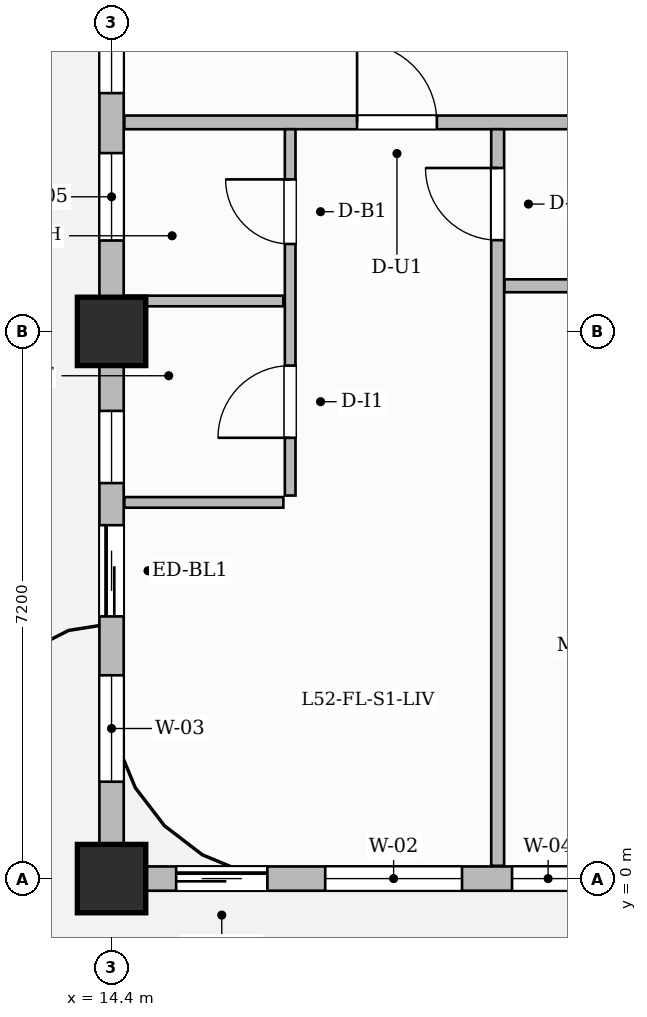
"""IFC4 building model, lengths in metres.
Left out: names, types, materials, properties, quantities, classifications, styles, units other than length and angle.
Written with IfcOpenShell. Run it as: python <this file> out.ifc"""

import sys

from ifc_helpers import new_model, si_unit, direction, frame, frame_2d, origin, origin_2d, place, context, subcontext, project, spatial, rectangle, extrude, source, transform, mapped, element, fill, save


model = new_model("IFC4")
c1 = context("Model", 3, precision=1e-05, world=origin(), true_north=direction((0.0, 1.0)))
c2 = subcontext(c1, "Body", "Model", "MODEL_VIEW")
j1 = project(units=[si_unit("LENGTHUNIT", "METRE"), si_unit("PLANEANGLEUNIT", "RADIAN")], contexts=[c1])
p1 = place(None, origin())
s1 = spatial("IfcSite", under=j1, at=p1, CompositionType="ELEMENT")
p2 = place(p1, origin())
s2 = spatial("IfcBuilding", under=s1, at=p2, CompositionType="ELEMENT")
p3 = place(p2, frame((0.0, 0.0, 209.6)))
s3 = spatial("IfcBuildingStorey", under=s2, at=p3, CompositionType="ELEMENT", Elevation=209.6)
m1 = source(origin(), c2, "Body", "SweptSolid", [
    extrude(rectangle(XDim=0.9, YDim=0.9, at=origin_2d()), origin(), (0.0, 0.0, 1.0), 3.85),
])
for number, where, z_axis, x_axis in (
    (1, (14.4, 0.0, 0.0), (0.0, 0.0, 1.0), (1.0, 0.0, 0.0)),
    (2, (14.4, 7.2, 0.0), (0.0, 0.0, 1.0), (1.0, 0.0, 0.0)),
):
    element("IfcColumn", number, at=place(p3, frame(where, z_axis=z_axis, x_axis=x_axis)), inside=s3, PredefinedType="COLUMN", context=c2, shape_type="MappedRepresentation", body=[
        mapped(m1, transform((0.0, 0.0, 0.0), scale=1.0)),
    ])
p4 = place(p3, frame((14.568, 9.95, 0.0), z_axis=(0.0, 0.0, 1.0), x_axis=(1.0, 0.0, 0.0)))
e3 = element("IfcWall", 3, at=p4, inside=s3, PredefinedType="PARTITIONING", context=c2, shape_type="SweptSolid", body=[
    extrude(rectangle(XDim=15.542, YDim=0.18, at=frame_2d((7.771, 0.0))), origin(), (0.0, 0.0, 1.0), 3.6),
])
p5 = place(p4, frame((3.062, 0.0, 0.0)))
e4 = element("IfcOpeningElement", 4, at=p5, cuts=e3, PredefinedType="OPENING", context=c2, shape_type="SweptSolid", body=[
    extrude(rectangle(XDim=1.05, YDim=2.25, at=frame_2d((0.525, 1.125))), frame((0.0, 0.1, 0.0), z_axis=(0.0, -1.0, 0.0), x_axis=(1.0, 0.0, 0.0)), (0.0, 0.0, 1.0), 0.2),
])
p6 = place(p3, frame((16.75, 5.04, 0.0), z_axis=(0.0, 0.0, 1.0), x_axis=(0.0, 1.0, 0.0)))
e5 = element("IfcWall", 5, at=p6, inside=s3, PredefinedType="PARTITIONING", context=c2, shape_type="SweptSolid", body=[
    extrude(rectangle(XDim=4.82, YDim=0.14, at=frame_2d((2.41, 0.0))), origin(), (0.0, 0.0, 1.0), 3.6),
])
p7 = place(p6, frame((0.76, 0.0, 0.0)))
e6 = element("IfcOpeningElement", 6, at=p7, cuts=e5, PredefinedType="OPENING", context=c2, shape_type="SweptSolid", body=[
    extrude(rectangle(XDim=0.95, YDim=2.15, at=frame_2d((0.475, 1.075))), frame((0.0, 0.08, 0.0), z_axis=(0.0, -1.0, 0.0), x_axis=(1.0, 0.0, 0.0)), (0.0, 0.0, 1.0), 0.16),
])
p8 = place(p6, frame((3.31, 0.0, 0.0)))
e7 = element("IfcOpeningElement", 7, at=p8, cuts=e5, PredefinedType="OPENING", context=c2, shape_type="SweptSolid", body=[
    extrude(rectangle(XDim=0.85, YDim=2.1, at=frame_2d((0.425, 1.05))), frame((0.0, 0.08, 0.0), z_axis=(0.0, -1.0, 0.0), x_axis=(1.0, 0.0, 0.0)), (0.0, 0.0, 1.0), 0.16),
])
p9 = place(p3, frame((14.59, 7.6, 0.0), z_axis=(0.0, 0.0, 1.0), x_axis=(1.0, 0.0, 0.0)))
e8 = element("IfcWall", 8, at=p9, inside=s3, PredefinedType="PARTITIONING", context=c2, shape_type="SweptSolid", body=[
    extrude(rectangle(XDim=2.07, YDim=0.14, at=frame_2d((1.035, 0.0))), origin(), (0.0, 0.0, 1.0), 3.6),
])
p10 = place(p3, frame((14.568, 4.95, 0.0), z_axis=(0.0, 0.0, 1.0), x_axis=(1.0, 0.0, 0.0)))
e9 = element("IfcWall", 9, at=p10, inside=s3, PredefinedType="PARTITIONING", context=c2, shape_type="SweptSolid", body=[
    extrude(rectangle(XDim=2.092, YDim=0.14, at=frame_2d((1.046, 0.0))), origin(), (0.0, 0.0, 1.0), 3.6),
])
p11 = place(p3, frame((19.48, 0.168, 0.0), z_axis=(0.0, 0.0, 1.0), x_axis=(0.0, 1.0, 0.0)))
e10 = element("IfcWall", 10, at=p11, inside=s3, PredefinedType="PARTITIONING", context=c2, shape_type="SweptSolid", body=[
    extrude(rectangle(XDim=9.692, YDim=0.17, at=frame_2d((4.846, 0.0))), origin(), (0.0, 0.0, 1.0), 3.6),
])
p12 = place(p11, frame((8.232, 0.0, 0.0)))
e11 = element("IfcOpeningElement", 11, at=p12, cuts=e10, PredefinedType="OPENING", context=c2, shape_type="SweptSolid", body=[
    extrude(rectangle(XDim=0.95, YDim=2.15, at=frame_2d((0.475, 1.075))), frame((0.0, 0.095, 0.0), z_axis=(0.0, -1.0, 0.0), x_axis=(1.0, 0.0, 0.0)), (0.0, 0.0, 1.0), 0.19),
])
p13 = place(p3, frame((19.57, 7.8, 0.0), z_axis=(0.0, 0.0, 1.0), x_axis=(1.0, 0.0, 0.0)))
e12 = element("IfcWall", 12, at=p13, inside=s3, PredefinedType="PARTITIONING", context=c2, shape_type="SweptSolid", body=[
    extrude(rectangle(XDim=10.54, YDim=0.17, at=frame_2d((5.27, 0.0))), origin(), (0.0, 0.0, 1.0), 3.6),
])
p14 = place(p13, frame((2.646, 0.0, 0.0)))
e13 = element("IfcOpeningElement", 13, at=p14, cuts=e12, PredefinedType="OPENING", context=c2, shape_type="SweptSolid", body=[
    extrude(rectangle(XDim=0.95, YDim=2.15, at=frame_2d((0.475, 1.075))), frame((0.0, 0.095, 0.0), z_axis=(0.0, -1.0, 0.0), x_axis=(1.0, 0.0, 0.0)), (0.0, 0.0, 1.0), 0.19),
])
p15 = place(p13, frame((4.865, 0.0, 0.0)))
e14 = element("IfcOpeningElement", 14, at=p15, cuts=e12, PredefinedType="OPENING", context=c2, shape_type="SweptSolid", body=[
    extrude(rectangle(XDim=0.95, YDim=2.15, at=frame_2d((0.475, 1.075))), frame((0.0, 0.095, 0.0), z_axis=(0.0, -1.0, 0.0), x_axis=(1.0, 0.0, 0.0)), (0.0, 0.0, 1.0), 0.19),
])
p16 = place(p13, frame((7.055, 0.0, 0.0)))
e15 = element("IfcOpeningElement", 15, at=p16, cuts=e12, PredefinedType="OPENING", context=c2, shape_type="SweptSolid", body=[
    extrude(rectangle(XDim=0.95, YDim=2.15, at=frame_2d((0.475, 1.075))), frame((0.0, 0.095, 0.0), z_axis=(0.0, -1.0, 0.0), x_axis=(1.0, 0.0, 0.0)), (0.0, 0.0, 1.0), 0.19),
])
p17 = place(p3, frame((14.4, 0.0, 0.0), z_axis=(0.0, 0.0, 1.0), x_axis=(1.0, 0.0, 0.0)))
e16 = element("IfcWall", 16, at=p17, inside=s3, PredefinedType="SOLIDWALL", context=c2, shape_type="SweptSolid", body=[
    extrude(rectangle(XDim=35.4, YDim=0.32, at=frame_2d((17.7, 0.0))), origin(), (0.0, 0.0, 1.0), 3.085),
])
p18 = place(p17, frame((0.85, 0.0, 0.0)))
e17 = element("IfcOpeningElement", 17, at=p18, cuts=e16, PredefinedType="OPENING", context=c2, shape_type="SweptSolid", body=[
    extrude(rectangle(XDim=1.2, YDim=2.2, at=frame_2d((0.6, 1.1))), frame((0.0, 0.17, 0.0), z_axis=(0.0, -1.0, 0.0), x_axis=(1.0, 0.0, 0.0)), (0.0, 0.0, 1.0), 0.34),
])
p19 = place(p17, frame((2.811, 0.0, 0.8)))
e18 = element("IfcOpeningElement", 18, at=p19, cuts=e16, PredefinedType="OPENING", context=c2, shape_type="SweptSolid", body=[
    extrude(rectangle(XDim=1.8, YDim=1.85, at=frame_2d((0.9, 0.925))), frame((0.0, 0.17, 0.0), z_axis=(0.0, -1.0, 0.0), x_axis=(1.0, 0.0, 0.0)), (0.0, 0.0, 1.0), 0.34),
])
p20 = place(p17, frame((5.269, 0.0, 0.8)))
e19 = element("IfcOpeningElement", 19, at=p20, cuts=e16, PredefinedType="OPENING", context=c2, shape_type="SweptSolid", body=[
    extrude(rectangle(XDim=0.95, YDim=1.75, at=frame_2d((0.475, 0.875))), frame((0.0, 0.17, 0.0), z_axis=(0.0, -1.0, 0.0), x_axis=(1.0, 0.0, 0.0)), (0.0, 0.0, 1.0), 0.34),
])
p21 = place(p17, frame((8.181, 0.0, 0.8)))
e20 = element("IfcOpeningElement", 20, at=p21, cuts=e16, PredefinedType="OPENING", context=c2, shape_type="SweptSolid", body=[
    extrude(rectangle(XDim=0.95, YDim=1.75, at=frame_2d((0.475, 0.875))), frame((0.0, 0.17, 0.0), z_axis=(0.0, -1.0, 0.0), x_axis=(1.0, 0.0, 0.0)), (0.0, 0.0, 1.0), 0.34),
])
p22 = place(p17, frame((9.81, 0.0, 0.8)))
e21 = element("IfcOpeningElement", 21, at=p22, cuts=e16, PredefinedType="OPENING", context=c2, shape_type="SweptSolid", body=[
    extrude(rectangle(XDim=1.4, YDim=1.85, at=frame_2d((0.7, 0.925))), frame((0.0, 0.17, 0.0), z_axis=(0.0, -1.0, 0.0), x_axis=(1.0, 0.0, 0.0)), (0.0, 0.0, 1.0), 0.34),
])
p23 = place(p17, frame((12.079, 0.0, 0.8)))
e22 = element("IfcOpeningElement", 22, at=p23, cuts=e16, PredefinedType="OPENING", context=c2, shape_type="SweptSolid", body=[
    extrude(rectangle(XDim=1.15, YDim=1.8, at=frame_2d((0.575, 0.9))), frame((0.0, 0.17, 0.0), z_axis=(0.0, -1.0, 0.0), x_axis=(1.0, 0.0, 0.0)), (0.0, 0.0, 1.0), 0.34),
])
p24 = place(p17, frame((16.804, 0.0, 0.8)))
e23 = element("IfcOpeningElement", 23, at=p24, cuts=e16, PredefinedType="OPENING", context=c2, shape_type="SweptSolid", body=[
    extrude(rectangle(XDim=1.8, YDim=1.85, at=frame_2d((0.9, 0.925))), frame((0.0, 0.17, 0.0), z_axis=(0.0, -1.0, 0.0), x_axis=(1.0, 0.0, 0.0)), (0.0, 0.0, 1.0), 0.34),
])
p25 = place(p17, frame((21.521, 0.0, 0.8)))
e24 = element("IfcOpeningElement", 24, at=p25, cuts=e16, PredefinedType="OPENING", context=c2, shape_type="SweptSolid", body=[
    extrude(rectangle(XDim=0.95, YDim=1.75, at=frame_2d((0.475, 0.875))), frame((0.0, 0.17, 0.0), z_axis=(0.0, -1.0, 0.0), x_axis=(1.0, 0.0, 0.0)), (0.0, 0.0, 1.0), 0.34),
])
p26 = place(p17, frame((23.904, 0.0, 0.8)))
e25 = element("IfcOpeningElement", 25, at=p26, cuts=e16, PredefinedType="OPENING", context=c2, shape_type="SweptSolid", body=[
    extrude(rectangle(XDim=1.8, YDim=1.85, at=frame_2d((0.9, 0.925))), frame((0.0, 0.17, 0.0), z_axis=(0.0, -1.0, 0.0), x_axis=(1.0, 0.0, 0.0)), (0.0, 0.0, 1.0), 0.34),
])
p27 = place(p17, frame((29.681, 0.0, 0.8)))
e26 = element("IfcOpeningElement", 26, at=p27, cuts=e16, PredefinedType="OPENING", context=c2, shape_type="SweptSolid", body=[
    extrude(rectangle(XDim=1.8, YDim=1.85, at=frame_2d((0.9, 0.925))), frame((0.0, 0.17, 0.0), z_axis=(0.0, -1.0, 0.0), x_axis=(1.0, 0.0, 0.0)), (0.0, 0.0, 1.0), 0.34),
])
p28 = place(p17, frame((32.327, 0.0, 0.8)))
e27 = element("IfcOpeningElement", 27, at=p28, cuts=e16, PredefinedType="OPENING", context=c2, shape_type="SweptSolid", body=[
    extrude(rectangle(XDim=1.8, YDim=1.85, at=frame_2d((0.9, 0.925))), frame((0.0, 0.17, 0.0), z_axis=(0.0, -1.0, 0.0), x_axis=(1.0, 0.0, 0.0)), (0.0, 0.0, 1.0), 0.34),
])
p29 = place(p3, frame((14.4, 0.05, 0.0), z_axis=(0.0, 0.0, 1.0), x_axis=(0.0, 1.0, 0.0)))
e28 = element("IfcWall", 28, at=p29, inside=s3, PredefinedType="SOLIDWALL", context=c2, shape_type="SweptSolid", body=[
    extrude(rectangle(XDim=25.1, YDim=0.32, at=frame_2d((12.55, 0.0))), origin(), (0.0, 0.0, 1.0), 3.085),
])
p30 = place(p29, frame((3.4, 0.0, 0.0)))
e29 = element("IfcOpeningElement", 29, at=p30, cuts=e28, PredefinedType="OPENING", context=c2, shape_type="SweptSolid", body=[
    extrude(rectangle(XDim=1.2, YDim=2.2, at=frame_2d((0.6, 1.1))), frame((0.0, 0.17, 0.0), z_axis=(0.0, -1.0, 0.0), x_axis=(1.0, 0.0, 0.0)), (0.0, 0.0, 1.0), 0.34),
])
p31 = place(p29, frame((1.225, 0.0, 0.8)))
e30 = element("IfcOpeningElement", 30, at=p31, cuts=e28, PredefinedType="OPENING", context=c2, shape_type="SweptSolid", body=[
    extrude(rectangle(XDim=1.4, YDim=1.85, at=frame_2d((0.7, 0.925))), frame((0.0, 0.17, 0.0), z_axis=(0.0, -1.0, 0.0), x_axis=(1.0, 0.0, 0.0)), (0.0, 0.0, 1.0), 0.34),
])
p32 = place(p29, frame((5.154, 0.0, 0.8)))
e31 = element("IfcOpeningElement", 31, at=p32, cuts=e28, PredefinedType="OPENING", context=c2, shape_type="SweptSolid", body=[
    extrude(rectangle(XDim=0.95, YDim=1.75, at=frame_2d((0.475, 0.875))), frame((0.0, 0.17, 0.0), z_axis=(0.0, -1.0, 0.0), x_axis=(1.0, 0.0, 0.0)), (0.0, 0.0, 1.0), 0.34),
])
p33 = place(p29, frame((8.346, 0.0, 0.8)))
e32 = element("IfcOpeningElement", 32, at=p33, cuts=e28, PredefinedType="OPENING", context=c2, shape_type="SweptSolid", body=[
    extrude(rectangle(XDim=1.15, YDim=1.8, at=frame_2d((0.575, 0.9))), frame((0.0, 0.17, 0.0), z_axis=(0.0, -1.0, 0.0), x_axis=(1.0, 0.0, 0.0)), (0.0, 0.0, 1.0), 0.34),
])
p34 = place(p29, frame((10.285, 0.0, 0.8)))
e33 = element("IfcOpeningElement", 33, at=p34, cuts=e28, PredefinedType="OPENING", context=c2, shape_type="SweptSolid", body=[
    extrude(rectangle(XDim=1.15, YDim=1.8, at=frame_2d((0.575, 0.9))), frame((0.0, 0.17, 0.0), z_axis=(0.0, -1.0, 0.0), x_axis=(1.0, 0.0, 0.0)), (0.0, 0.0, 1.0), 0.34),
])
p35 = place(p29, frame((12.114, 0.0, 0.8)))
e34 = element("IfcOpeningElement", 34, at=p35, cuts=e28, PredefinedType="OPENING", context=c2, shape_type="SweptSolid", body=[
    extrude(rectangle(XDim=1.15, YDim=1.8, at=frame_2d((0.575, 0.9))), frame((0.0, 0.17, 0.0), z_axis=(0.0, -1.0, 0.0), x_axis=(1.0, 0.0, 0.0)), (0.0, 0.0, 1.0), 0.34),
])
p36 = place(p29, frame((15.675, 0.0, 0.8)))
e35 = element("IfcOpeningElement", 35, at=p36, cuts=e28, PredefinedType="OPENING", context=c2, shape_type="SweptSolid", body=[
    extrude(rectangle(XDim=1.8, YDim=1.85, at=frame_2d((0.9, 0.925))), frame((0.0, 0.17, 0.0), z_axis=(0.0, -1.0, 0.0), x_axis=(1.0, 0.0, 0.0)), (0.0, 0.0, 1.0), 0.34),
])
p37 = place(p29, frame((18.425, 0.0, 0.8)))
e36 = element("IfcOpeningElement", 36, at=p37, cuts=e28, PredefinedType="OPENING", context=c2, shape_type="SweptSolid", body=[
    extrude(rectangle(XDim=1.8, YDim=1.85, at=frame_2d((0.9, 0.925))), frame((0.0, 0.17, 0.0), z_axis=(0.0, -1.0, 0.0), x_axis=(1.0, 0.0, 0.0)), (0.0, 0.0, 1.0), 0.34),
])
p38 = place(p29, frame((22.65, 0.0, 0.8)))
e37 = element("IfcOpeningElement", 37, at=p38, cuts=e28, PredefinedType="OPENING", context=c2, shape_type="SweptSolid", body=[
    extrude(rectangle(XDim=1.4, YDim=1.85, at=frame_2d((0.7, 0.925))), frame((0.0, 0.17, 0.0), z_axis=(0.0, -1.0, 0.0), x_axis=(1.0, 0.0, 0.0)), (0.0, 0.0, 1.0), 0.34),
])
m2 = source(origin(), c2, "Body", "SweptSolid", [
    extrude(rectangle(XDim=0.95, YDim=2.15, at=frame_2d((0.475, 1.075))), frame((0.0, 0.025, 0.0), z_axis=(0.0, -1.0, 0.0), x_axis=(1.0, 0.0, 0.0)), (0.0, 0.0, 1.0), 0.05),
])
p39 = place(p7, origin())
e38 = element("IfcDoor", 38, at=p39, inside=s3, OperationType="SINGLE_SWING_LEFT", PredefinedType="DOOR", context=c2, shape_type="MappedRepresentation", body=[
    mapped(m2, transform((0.0, 0.0, 0.0), scale=1.0)),
])
fill(e6, e38)
m3 = source(origin(), c2, "Body", "SweptSolid", [
    extrude(rectangle(XDim=0.85, YDim=2.1, at=frame_2d((0.425, 1.05))), frame((0.0, 0.025, 0.0), z_axis=(0.0, -1.0, 0.0), x_axis=(1.0, 0.0, 0.0)), (0.0, 0.0, 1.0), 0.05),
])
p40 = place(p8, origin())
e39 = element("IfcDoor", 39, at=p40, inside=s3, OperationType="SINGLE_SWING_RIGHT", PredefinedType="DOOR", context=c2, shape_type="MappedRepresentation", body=[
    mapped(m3, transform((0.0, 0.0, 0.0), scale=1.0)),
])
fill(e7, e39)
m4 = source(origin(), c2, "Body", "SweptSolid", [
    extrude(rectangle(XDim=1.05, YDim=2.25, at=frame_2d((0.525, 1.125))), frame((0.0, 0.025, 0.0), z_axis=(0.0, -1.0, 0.0), x_axis=(1.0, 0.0, 0.0)), (0.0, 0.0, 1.0), 0.05),
])
p41 = place(p5, origin())
e40 = element("IfcDoor", 40, at=p41, inside=s3, OperationType="SINGLE_SWING_LEFT", PredefinedType="DOOR", context=c2, shape_type="MappedRepresentation", body=[
    mapped(m4, transform((0.0, 0.0, 0.0), scale=1.0)),
])
fill(e4, e40)
p42 = place(p12, origin())
e41 = element("IfcDoor", 41, at=p42, inside=s3, OperationType="SINGLE_SWING_RIGHT", PredefinedType="DOOR", context=c2, shape_type="MappedRepresentation", body=[
    mapped(m2, transform((0.0, 0.0, 0.0), scale=1.0)),
])
fill(e11, e41)
m5 = source(origin(), c2, "Body", "SweptSolid", [
    extrude(rectangle(XDim=1.2, YDim=2.2, at=frame_2d((0.6, 1.1))), frame((0.0, 0.025, 0.0), z_axis=(0.0, -1.0, 0.0), x_axis=(1.0, 0.0, 0.0)), (0.0, 0.0, 1.0), 0.05),
])
p43 = place(p18, origin())
e42 = element("IfcDoor", 42, at=p43, inside=s3, OperationType="SLIDING_TO_LEFT", PredefinedType="DOOR", context=c2, shape_type="MappedRepresentation", body=[
    mapped(m5, transform((0.0, 0.0, 0.0), scale=1.0)),
])
fill(e17, e42)
p44 = place(p30, origin())
e43 = element("IfcDoor", 43, at=p44, inside=s3, OperationType="SLIDING_TO_LEFT", PredefinedType="DOOR", context=c2, shape_type="MappedRepresentation", body=[
    mapped(m5, transform((0.0, 0.0, 0.0), scale=1.0)),
])
fill(e29, e43)
m6 = source(origin(), c2, "Body", "SweptSolid", [
    extrude(rectangle(XDim=1.8, YDim=1.85, at=frame_2d((0.9, 0.925))), frame((0.0, 0.03, 0.0), z_axis=(0.0, -1.0, 0.0), x_axis=(1.0, 0.0, 0.0)), (0.0, 0.0, 1.0), 0.06),
])
p45 = place(p19, origin())
e44 = element("IfcWindow", 44, at=p45, inside=s3, PartitioningType="DOUBLE_PANEL_VERTICAL", PredefinedType="WINDOW", context=c2, shape_type="MappedRepresentation", body=[
    mapped(m6, transform((0.0, 0.0, 0.0), scale=1.0)),
])
fill(e18, e44)
m7 = source(origin(), c2, "Body", "SweptSolid", [
    extrude(rectangle(XDim=0.95, YDim=1.75, at=frame_2d((0.475, 0.875))), frame((0.0, 0.03, 0.0), z_axis=(0.0, -1.0, 0.0), x_axis=(1.0, 0.0, 0.0)), (0.0, 0.0, 1.0), 0.06),
])
p46 = place(p20, origin())
e45 = element("IfcWindow", 45, at=p46, inside=s3, PartitioningType="SINGLE_PANEL", PredefinedType="WINDOW", context=c2, shape_type="MappedRepresentation", body=[
    mapped(m7, transform((0.0, 0.0, 0.0), scale=1.0)),
])
fill(e19, e45)
m8 = source(origin(), c2, "Body", "SweptSolid", [
    extrude(rectangle(XDim=1.4, YDim=1.85, at=frame_2d((0.7, 0.925))), frame((0.0, 0.03, 0.0), z_axis=(0.0, -1.0, 0.0), x_axis=(1.0, 0.0, 0.0)), (0.0, 0.0, 1.0), 0.06),
])
p47 = place(p31, origin())
e46 = element("IfcWindow", 46, at=p47, inside=s3, PartitioningType="SINGLE_PANEL", PredefinedType="WINDOW", context=c2, shape_type="MappedRepresentation", body=[
    mapped(m8, transform((0.0, 0.0, 0.0), scale=1.0)),
])
fill(e30, e46)
p48 = place(p32, origin())
e47 = element("IfcWindow", 47, at=p48, inside=s3, PartitioningType="SINGLE_PANEL", PredefinedType="WINDOW", context=c2, shape_type="MappedRepresentation", body=[
    mapped(m7, transform((0.0, 0.0, 0.0), scale=1.0)),
])
fill(e31, e47)
m9 = source(origin(), c2, "Body", "SweptSolid", [
    extrude(rectangle(XDim=1.15, YDim=1.8, at=frame_2d((0.575, 0.9))), frame((0.0, 0.03, 0.0), z_axis=(0.0, -1.0, 0.0), x_axis=(1.0, 0.0, 0.0)), (0.0, 0.0, 1.0), 0.06),
])
p49 = place(p33, origin())
e48 = element("IfcWindow", 48, at=p49, inside=s3, PartitioningType="SINGLE_PANEL", PredefinedType="WINDOW", context=c2, shape_type="MappedRepresentation", body=[
    mapped(m9, transform((0.0, 0.0, 0.0), scale=1.0)),
])
fill(e32, e48)
p50 = place(p34, origin())
e49 = element("IfcWindow", 49, at=p50, inside=s3, PartitioningType="SINGLE_PANEL", PredefinedType="WINDOW", context=c2, shape_type="MappedRepresentation", body=[
    mapped(m9, transform((0.0, 0.0, 0.0), scale=1.0)),
])
fill(e33, e49)
save(model, sys.argv[1])
